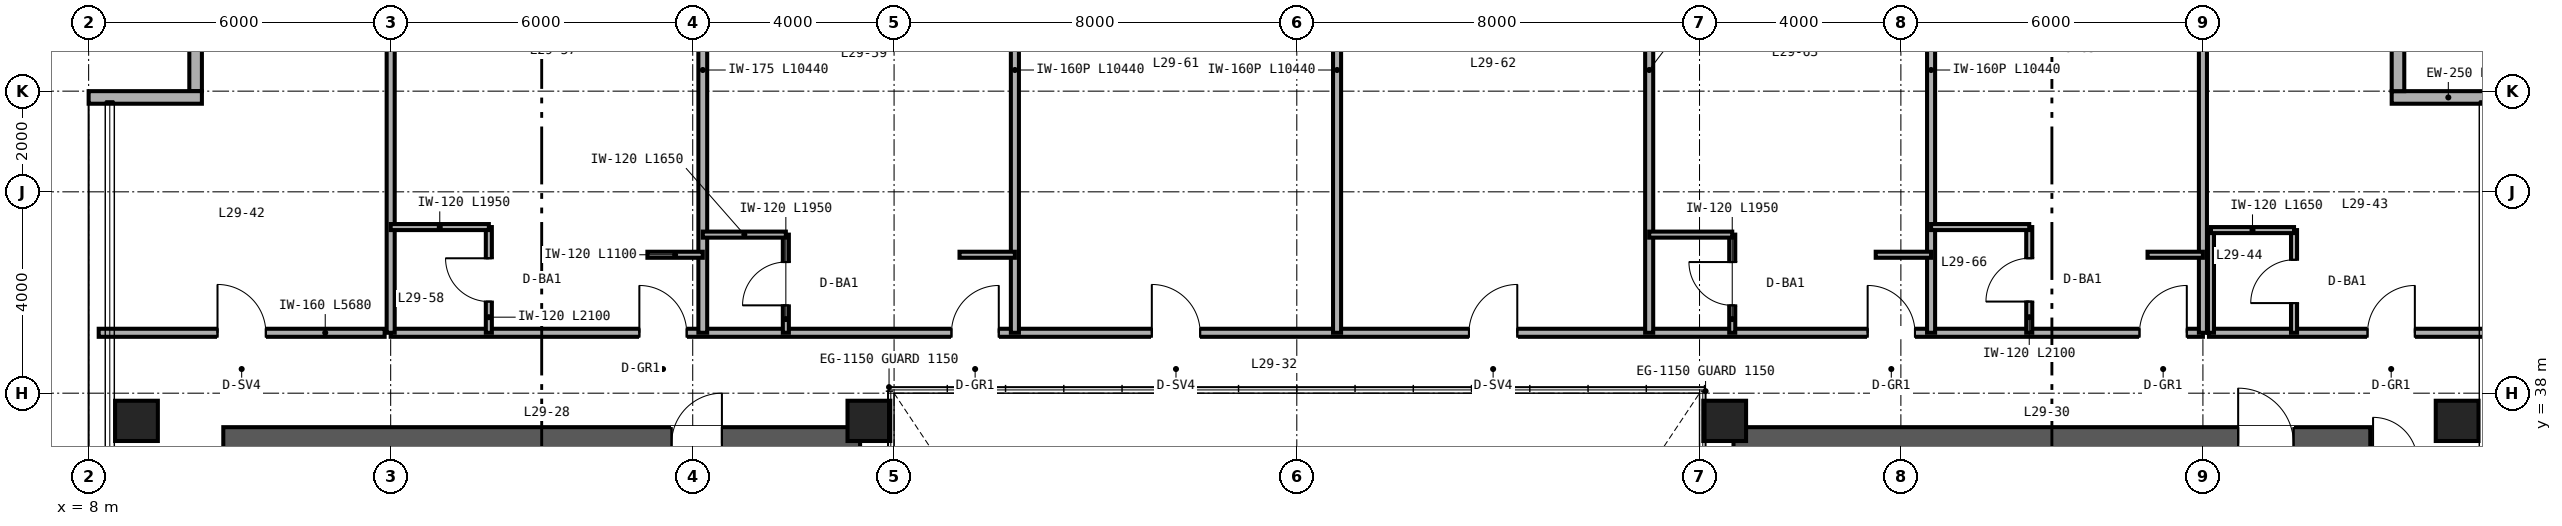
"""IFC4 building model, lengths in metres.
Left out: names, types, materials, properties, quantities, classifications, styles, units other than length and angle.
Written with IfcOpenShell. Run it as: python <this file> out.ifc"""

import sys

from ifc_helpers import new_model, si_unit, direction, frame, frame_2d, origin, origin_2d, place, context, subcontext, project, spatial, rectangle, hollow_rectangle, extrude, source, transform, mapped, element, fill, save


model = new_model("IFC4")
c1 = context("Model", 3, precision=1e-05, world=origin(), true_north=direction((0.0, 1.0)))
c2 = subcontext(c1, "Body", "Model", "MODEL_VIEW")
j1 = project(units=[si_unit("LENGTHUNIT", "METRE"), si_unit("PLANEANGLEUNIT", "RADIAN")], contexts=[c1])
p1 = place(None, origin())
s1 = spatial("IfcSite", under=j1, at=p1, CompositionType="ELEMENT")
p2 = place(p1, origin())
s2 = spatial("IfcBuilding", under=s1, at=p2, CompositionType="ELEMENT")
p3 = place(p2, frame((0.0, 0.0, 118.8)))
s3 = spatial("IfcBuildingStorey", under=s2, at=p3, CompositionType="ELEMENT", Elevation=118.8)
p4 = place(p3, frame((10.675, 37.0, 0.0), z_axis=(0.0, 0.0, 1.0), x_axis=(1.0, 0.0, 0.0)))
e1 = element("IfcWall", 1, at=p4, inside=s3, PredefinedType="SHEAR", context=c2, shape_type="SweptSolid", body=[
    extrude(rectangle(XDim=12.65, YDim=0.65, at=frame_2d((6.325, 0.0))), origin(), (0.0, 0.0, 1.0), 3.36),
])
p5 = place(p4, frame((8.905, 0.0, 0.0)))
e2 = element("IfcOpeningElement", 2, at=p5, cuts=e1, PredefinedType="OPENING", context=c2, shape_type="SweptSolid", body=[
    extrude(rectangle(XDim=1.0, YDim=2.15, at=frame_2d((0.5, 1.075))), frame((0.0, 0.335, 0.0), z_axis=(0.0, -1.0, 0.0), x_axis=(1.0, 0.0, 0.0)), (0.0, 0.0, 1.0), 0.67),
])
p6 = place(p3, frame((40.675, 37.0, 0.0), z_axis=(0.0, 0.0, 1.0), x_axis=(1.0, 0.0, 0.0)))
e3 = element("IfcWall", 3, at=p6, inside=s3, PredefinedType="SHEAR", context=c2, shape_type="SweptSolid", body=[
    extrude(rectangle(XDim=12.65, YDim=0.65, at=frame_2d((6.325, 0.0))), origin(), (0.0, 0.0, 1.0), 3.36),
])
p7 = place(p6, frame((10.025, 0.0, 0.0)))
e4 = element("IfcOpeningElement", 4, at=p7, cuts=e3, PredefinedType="OPENING", context=c2, shape_type="SweptSolid", body=[
    extrude(rectangle(XDim=1.1, YDim=2.15, at=frame_2d((0.55, 1.075))), frame((0.0, 0.335, 0.0), z_axis=(0.0, -1.0, 0.0), x_axis=(1.0, 0.0, 0.0)), (0.0, 0.0, 1.0), 0.67),
])
m1 = source(origin(), c2, "Body", "SweptSolid", [
    extrude(hollow_rectangle(XDim=0.85, YDim=0.8, WallThickness=0.032, at=origin_2d()), origin(), (0.0, 0.0, 1.0), 3.36),
])
for number, where, z_axis, x_axis in (
    (5, (8.95, 37.45, 0.0), (0.0, 0.0, 1.0), (1.0, 0.0, 0.0)),
    (6, (23.5, 37.45, 0.0), (0.0, 0.0, 1.0), (1.0, 0.0, 0.0)),
    (7, (40.5, 37.45, 0.0), (0.0, 0.0, 1.0), (1.0, 0.0, 0.0)),
    (8, (55.05, 37.45, 0.0), (0.0, 0.0, 1.0), (1.0, 0.0, 0.0)),
):
    element("IfcColumn", number, at=place(p3, frame(where, z_axis=z_axis, x_axis=x_axis)), inside=s3, PredefinedType="COLUMN", context=c2, shape_type="MappedRepresentation", body=[
        mapped(m1, transform((0.0, 0.0, 0.0), scale=1.0)),
    ])
p8 = place(p3, frame((56.0, 43.875, 0.0), z_axis=(0.0, 0.0, 1.0), x_axis=(-1.0, 0.0, 0.0)))
e9 = element("IfcWall", 9, at=p8, inside=s3, PredefinedType="SOLIDWALL", context=c2, shape_type="SweptSolid", body=[
    extrude(rectangle(XDim=2.25, YDim=0.25, at=frame_2d((1.125, 0.0))), origin(), (0.0, 0.0, 1.0), 3.36),
])
for number, where, z_axis, x_axis in (
    (10, (53.875, 44.0, 0.0), (0.0, 0.0, 1.0), (0.0, 1.0, 0.0)),
    (11, (10.125, 46.0, 0.0), (0.0, 0.0, 1.0), (0.0, -1.0, 0.0)),
):
    element("IfcWall", number, at=place(p3, frame(where, z_axis=z_axis, x_axis=x_axis)), inside=s3, PredefinedType="SOLIDWALL", context=c2, shape_type="SweptSolid", body=[
        extrude(rectangle(XDim=2.0, YDim=0.25, at=frame_2d((1.0, 0.0))), origin(), (0.0, 0.0, 1.0), 3.36),
    ])
p9 = place(p3, frame((10.25, 43.875, 0.0), z_axis=(0.0, 0.0, 1.0), x_axis=(-1.0, 0.0, 0.0)))
e12 = element("IfcWall", 12, at=p9, inside=s3, PredefinedType="SOLIDWALL", context=c2, shape_type="SweptSolid", body=[
    extrude(rectangle(XDim=2.25, YDim=0.25, at=frame_2d((1.125, 0.0))), origin(), (0.0, 0.0, 1.0), 3.36),
])
p10 = place(p3, frame((8.2, 39.2, 0.0), z_axis=(0.0, 0.0, 1.0), x_axis=(1.0, 0.0, 0.0)))
e13 = element("IfcWall", 13, at=p10, inside=s3, PredefinedType="PARTITIONING", context=c2, shape_type="SweptSolid", body=[
    extrude(rectangle(XDim=5.68, YDim=0.16, at=frame_2d((2.84, 0.0))), origin(), (0.0, 0.0, 1.0), 3.36),
])
p11 = place(p10, frame((2.36, 0.0, 0.0)))
e14 = element("IfcOpeningElement", 14, at=p11, cuts=e13, PredefinedType="OPENING", context=c2, shape_type="SweptSolid", body=[
    extrude(rectangle(XDim=0.96, YDim=2.15, at=frame_2d((0.48, 1.075))), frame((0.0, 0.09, 0.0), z_axis=(0.0, -1.0, 0.0), x_axis=(1.0, 0.0, 0.0)), (0.0, 0.0, 1.0), 0.18),
])
p12 = place(p3, frame((50.12, 39.2, 0.0), z_axis=(0.0, 0.0, 1.0), x_axis=(1.0, 0.0, 0.0)))
e15 = element("IfcWall", 15, at=p12, inside=s3, PredefinedType="PARTITIONING", context=c2, shape_type="SweptSolid", body=[
    extrude(rectangle(XDim=5.68, YDim=0.16, at=frame_2d((2.84, 0.0))), origin(), (0.0, 0.0, 1.0), 3.36),
])
p13 = place(p12, frame((3.15, 0.0, 0.0)))
e16 = element("IfcOpeningElement", 16, at=p13, cuts=e15, PredefinedType="OPENING", context=c2, shape_type="SweptSolid", body=[
    extrude(rectangle(XDim=0.94, YDim=2.15, at=frame_2d((0.47, 1.075))), frame((0.0, 0.09, 0.0), z_axis=(0.0, -1.0, 0.0), x_axis=(1.0, 0.0, 0.0)), (0.0, 0.0, 1.0), 0.18),
])
p14 = place(p3, frame((51.81, 39.2, 0.0), z_axis=(0.0, 0.0, 1.0), x_axis=(0.0, 1.0, 0.0)))
e17 = element("IfcWall", 17, at=p14, inside=s3, PredefinedType="PARTITIONING", context=c2, shape_type="SweptSolid", body=[
    extrude(rectangle(XDim=2.04, YDim=0.12, at=frame_2d((1.02, 0.0))), origin(), (0.0, 0.0, 1.0), 3.36),
])
p15 = place(p14, frame((0.59, 0.0, 0.0)))
e18 = element("IfcOpeningElement", 18, at=p15, cuts=e17, PredefinedType="OPENING", context=c2, shape_type="SweptSolid", body=[
    extrude(rectangle(XDim=0.86, YDim=2.1, at=frame_2d((0.43, 1.05))), frame((0.0, 0.07, 0.0), z_axis=(0.0, -1.0, 0.0), x_axis=(1.0, 0.0, 0.0)), (0.0, 0.0, 1.0), 0.14),
])
p16 = place(p3, frame((50.16, 39.2, 0.0), z_axis=(0.0, 0.0, 1.0), x_axis=(0.0, 1.0, 0.0)))
e19 = element("IfcWall", 19, at=p16, inside=s3, PredefinedType="PARTITIONING", context=c2, shape_type="SweptSolid", body=[
    extrude(rectangle(XDim=2.04, YDim=0.12, at=frame_2d((1.02, 0.0))), origin(), (0.0, 0.0, 1.0), 3.36),
])
p17 = place(p3, frame((50.16, 41.24, 0.0), z_axis=(0.0, 0.0, 1.0), x_axis=(1.0, 0.0, 0.0)))
e20 = element("IfcWall", 20, at=p17, inside=s3, PredefinedType="PARTITIONING", context=c2, shape_type="SweptSolid", body=[
    extrude(rectangle(XDim=1.65, YDim=0.12, at=frame_2d((0.825, 0.0))), origin(), (0.0, 0.0, 1.0), 3.36),
])
p18 = place(p3, frame((14.0, 39.2, 0.0), z_axis=(0.0, 0.0, 1.0), x_axis=(1.0, 0.0, 0.0)))
e21 = element("IfcWall", 21, at=p18, inside=s3, PredefinedType="PARTITIONING", context=c2, shape_type="SweptSolid", body=[
    extrude(rectangle(XDim=36.0, YDim=0.16, at=frame_2d((18.0, 0.0))), origin(), (0.0, 0.0, 1.0), 2.581),
])
p19 = place(p18, frame((4.94, 0.0, 0.0)))
e22 = element("IfcOpeningElement", 22, at=p19, cuts=e21, PredefinedType="OPENING", context=c2, shape_type="SweptSolid", body=[
    extrude(rectangle(XDim=0.94, YDim=2.15, at=frame_2d((0.47, 1.075))), frame((0.0, 0.09, 0.0), z_axis=(0.0, -1.0, 0.0), x_axis=(1.0, 0.0, 0.0)), (0.0, 0.0, 1.0), 0.18),
])
p20 = place(p18, frame((11.14, 0.0, 0.0)))
e23 = element("IfcOpeningElement", 23, at=p20, cuts=e21, PredefinedType="OPENING", context=c2, shape_type="SweptSolid", body=[
    extrude(rectangle(XDim=0.94, YDim=2.15, at=frame_2d((0.47, 1.075))), frame((0.0, 0.09, 0.0), z_axis=(0.0, -1.0, 0.0), x_axis=(1.0, 0.0, 0.0)), (0.0, 0.0, 1.0), 0.18),
])
p21 = place(p18, frame((15.12, 0.0, 0.0)))
e24 = element("IfcOpeningElement", 24, at=p21, cuts=e21, PredefinedType="OPENING", context=c2, shape_type="SweptSolid", body=[
    extrude(rectangle(XDim=0.96, YDim=2.15, at=frame_2d((0.48, 1.075))), frame((0.0, 0.09, 0.0), z_axis=(0.0, -1.0, 0.0), x_axis=(1.0, 0.0, 0.0)), (0.0, 0.0, 1.0), 0.18),
])
p22 = place(p18, frame((21.42, 0.0, 0.0)))
e25 = element("IfcOpeningElement", 25, at=p22, cuts=e21, PredefinedType="OPENING", context=c2, shape_type="SweptSolid", body=[
    extrude(rectangle(XDim=0.96, YDim=2.15, at=frame_2d((0.48, 1.075))), frame((0.0, 0.09, 0.0), z_axis=(0.0, -1.0, 0.0), x_axis=(1.0, 0.0, 0.0)), (0.0, 0.0, 1.0), 0.18),
])
p23 = place(p18, frame((29.34, 0.0, 0.0)))
e26 = element("IfcOpeningElement", 26, at=p23, cuts=e21, PredefinedType="OPENING", context=c2, shape_type="SweptSolid", body=[
    extrude(rectangle(XDim=0.94, YDim=2.15, at=frame_2d((0.47, 1.075))), frame((0.0, 0.09, 0.0), z_axis=(0.0, -1.0, 0.0), x_axis=(1.0, 0.0, 0.0)), (0.0, 0.0, 1.0), 0.18),
])
p24 = place(p18, frame((34.74, 0.0, 0.0)))
e27 = element("IfcOpeningElement", 27, at=p24, cuts=e21, PredefinedType="OPENING", context=c2, shape_type="SweptSolid", body=[
    extrude(rectangle(XDim=0.94, YDim=2.15, at=frame_2d((0.47, 1.075))), frame((0.0, 0.09, 0.0), z_axis=(0.0, -1.0, 0.0), x_axis=(1.0, 0.0, 0.0)), (0.0, 0.0, 1.0), 0.18),
])
for number, where, z_axis, x_axis in (
    (28, (14.0, 39.2, 0.0), (0.0, 0.0, 1.0), (0.0, 1.0, 0.0)),
    (29, (50.0, 39.2, 0.0), (0.0, 0.0, 1.0), (0.0, 1.0, 0.0)),
):
    element("IfcWall", number, at=place(p3, frame(where, z_axis=z_axis, x_axis=x_axis)), inside=s3, PredefinedType="PARTITIONING", context=c2, shape_type="SweptSolid", body=[
        extrude(rectangle(XDim=10.44, YDim=0.16, at=frame_2d((5.22, 0.0))), origin(), (0.0, 0.0, 1.0), 2.667),
    ])
p25 = place(p3, frame((20.2, 39.2, 0.0), z_axis=(0.0, 0.0, 1.0), x_axis=(0.0, 1.0, 0.0)))
e30 = element("IfcWall", 30, at=p25, inside=s3, PredefinedType="PARTITIONING", context=c2, shape_type="SweptSolid", body=[
    extrude(rectangle(XDim=10.44, YDim=0.175, at=frame_2d((5.22, 0.0))), origin(), (0.0, 0.0, 1.0), 2.667),
])
p26 = place(p3, frame((15.95, 39.2, 0.0), z_axis=(0.0, 0.0, 1.0), x_axis=(0.0, 1.0, 0.0)))
e31 = element("IfcWall", 31, at=p26, inside=s3, PredefinedType="PARTITIONING", context=c2, shape_type="SweptSolid", body=[
    extrude(rectangle(XDim=2.1, YDim=0.12, at=frame_2d((1.05, 0.0))), origin(), (0.0, 0.0, 1.0), 3.36),
])
p27 = place(p26, frame((0.62, 0.0, 0.0)))
e32 = element("IfcOpeningElement", 32, at=p27, cuts=e31, PredefinedType="OPENING", context=c2, shape_type="SweptSolid", body=[
    extrude(rectangle(XDim=0.86, YDim=2.1, at=frame_2d((0.43, 1.05))), frame((0.0, 0.07, 0.0), z_axis=(0.0, -1.0, 0.0), x_axis=(1.0, 0.0, 0.0)), (0.0, 0.0, 1.0), 0.14),
])
p28 = place(p3, frame((14.0, 41.3, 0.0), z_axis=(0.0, 0.0, 1.0), x_axis=(1.0, 0.0, 0.0)))
e33 = element("IfcWall", 33, at=p28, inside=s3, PredefinedType="PARTITIONING", context=c2, shape_type="SweptSolid", body=[
    extrude(rectangle(XDim=1.95, YDim=0.12, at=frame_2d((0.975, 0.0))), origin(), (0.0, 0.0, 1.0), 3.36),
])
p29 = place(p3, frame((19.1, 40.75, 0.0), z_axis=(0.0, 0.0, 1.0), x_axis=(1.0, 0.0, 0.0)))
e34 = element("IfcWall", 34, at=p29, inside=s3, PredefinedType="PARTITIONING", context=c2, shape_type="SweptSolid", body=[
    extrude(rectangle(XDim=1.1, YDim=0.12, at=frame_2d((0.55, 0.0))), origin(), (0.0, 0.0, 1.0), 3.36),
])
p30 = place(p3, frame((26.4, 39.2, 0.0), z_axis=(0.0, 0.0, 1.0), x_axis=(0.0, 1.0, 0.0)))
e35 = element("IfcWall", 35, at=p30, inside=s3, PredefinedType="PARTITIONING", context=c2, shape_type="SweptSolid", body=[
    extrude(rectangle(XDim=10.44, YDim=0.16, at=frame_2d((5.22, 0.0))), origin(), (0.0, 0.0, 1.0), 2.433),
])
p31 = place(p3, frame((21.85, 39.2, 0.0), z_axis=(0.0, 0.0, 1.0), x_axis=(0.0, 1.0, 0.0)))
e36 = element("IfcWall", 36, at=p31, inside=s3, PredefinedType="PARTITIONING", context=c2, shape_type="SweptSolid", body=[
    extrude(rectangle(XDim=1.95, YDim=0.12, at=frame_2d((0.975, 0.0))), origin(), (0.0, 0.0, 1.0), 3.36),
])
p32 = place(p31, frame((0.545, 0.0, 0.0)))
e37 = element("IfcOpeningElement", 37, at=p32, cuts=e36, PredefinedType="OPENING", context=c2, shape_type="SweptSolid", body=[
    extrude(rectangle(XDim=0.86, YDim=2.1, at=frame_2d((0.43, 1.05))), frame((0.0, 0.07, 0.0), z_axis=(0.0, -1.0, 0.0), x_axis=(1.0, 0.0, 0.0)), (0.0, 0.0, 1.0), 0.14),
])
p33 = place(p3, frame((20.2, 41.15, 0.0), z_axis=(0.0, 0.0, 1.0), x_axis=(1.0, 0.0, 0.0)))
e38 = element("IfcWall", 38, at=p33, inside=s3, PredefinedType="PARTITIONING", context=c2, shape_type="SweptSolid", body=[
    extrude(rectangle(XDim=1.65, YDim=0.12, at=frame_2d((0.825, 0.0))), origin(), (0.0, 0.0, 1.0), 3.36),
])
p34 = place(p3, frame((25.3, 40.75, 0.0), z_axis=(0.0, 0.0, 1.0), x_axis=(1.0, 0.0, 0.0)))
e39 = element("IfcWall", 39, at=p34, inside=s3, PredefinedType="PARTITIONING", context=c2, shape_type="SweptSolid", body=[
    extrude(rectangle(XDim=1.1, YDim=0.12, at=frame_2d((0.55, 0.0))), origin(), (0.0, 0.0, 1.0), 3.36),
])
for number, where, z_axis, x_axis in (
    (40, (32.8, 39.2, 0.0), (0.0, 0.0, 1.0), (0.0, 1.0, 0.0)),
    (41, (39.0, 39.2, 0.0), (0.0, 0.0, 1.0), (0.0, 1.0, 0.0)),
):
    element("IfcWall", number, at=place(p3, frame(where, z_axis=z_axis, x_axis=x_axis)), inside=s3, PredefinedType="PARTITIONING", context=c2, shape_type="SweptSolid", body=[
        extrude(rectangle(XDim=10.44, YDim=0.16, at=frame_2d((5.22, 0.0))), origin(), (0.0, 0.0, 1.0), 2.433),
    ])
p35 = place(p3, frame((44.6, 39.2, 0.0), z_axis=(0.0, 0.0, 1.0), x_axis=(0.0, 1.0, 0.0)))
e42 = element("IfcWall", 42, at=p35, inside=s3, PredefinedType="PARTITIONING", context=c2, shape_type="SweptSolid", body=[
    extrude(rectangle(XDim=10.44, YDim=0.16, at=frame_2d((5.22, 0.0))), origin(), (0.0, 0.0, 1.0), 2.667),
])
p36 = place(p3, frame((40.65, 39.2, 0.0), z_axis=(0.0, 0.0, 1.0), x_axis=(0.0, 1.0, 0.0)))
e43 = element("IfcWall", 43, at=p36, inside=s3, PredefinedType="PARTITIONING", context=c2, shape_type="SweptSolid", body=[
    extrude(rectangle(XDim=1.95, YDim=0.12, at=frame_2d((0.975, 0.0))), origin(), (0.0, 0.0, 1.0), 2.581),
])
p37 = place(p36, frame((0.545, 0.0, 0.0)))
e44 = element("IfcOpeningElement", 44, at=p37, cuts=e43, PredefinedType="OPENING", context=c2, shape_type="SweptSolid", body=[
    extrude(rectangle(XDim=0.86, YDim=2.1, at=frame_2d((0.43, 1.05))), frame((0.0, 0.07, 0.0), z_axis=(0.0, -1.0, 0.0), x_axis=(1.0, 0.0, 0.0)), (0.0, 0.0, 1.0), 0.14),
])
p38 = place(p3, frame((39.0, 41.15, 0.0), z_axis=(0.0, 0.0, 1.0), x_axis=(1.0, 0.0, 0.0)))
e45 = element("IfcWall", 45, at=p38, inside=s3, PredefinedType="PARTITIONING", context=c2, shape_type="SweptSolid", body=[
    extrude(rectangle(XDim=1.65, YDim=0.12, at=frame_2d((0.825, 0.0))), origin(), (0.0, 0.0, 1.0), 2.581),
])
p39 = place(p3, frame((43.5, 40.75, 0.0), z_axis=(0.0, 0.0, 1.0), x_axis=(1.0, 0.0, 0.0)))
e46 = element("IfcWall", 46, at=p39, inside=s3, PredefinedType="PARTITIONING", context=c2, shape_type="SweptSolid", body=[
    extrude(rectangle(XDim=1.1, YDim=0.12, at=frame_2d((0.55, 0.0))), origin(), (0.0, 0.0, 1.0), 3.36),
])
p40 = place(p3, frame((46.55, 39.2, 0.0), z_axis=(0.0, 0.0, 1.0), x_axis=(0.0, 1.0, 0.0)))
e47 = element("IfcWall", 47, at=p40, inside=s3, PredefinedType="PARTITIONING", context=c2, shape_type="SweptSolid", body=[
    extrude(rectangle(XDim=2.1, YDim=0.12, at=frame_2d((1.05, 0.0))), origin(), (0.0, 0.0, 1.0), 3.36),
])
p41 = place(p40, frame((0.62, 0.0, 0.0)))
e48 = element("IfcOpeningElement", 48, at=p41, cuts=e47, PredefinedType="OPENING", context=c2, shape_type="SweptSolid", body=[
    extrude(rectangle(XDim=0.86, YDim=2.1, at=frame_2d((0.43, 1.05))), frame((0.0, 0.07, 0.0), z_axis=(0.0, -1.0, 0.0), x_axis=(1.0, 0.0, 0.0)), (0.0, 0.0, 1.0), 0.14),
])
p42 = place(p3, frame((44.6, 41.3, 0.0), z_axis=(0.0, 0.0, 1.0), x_axis=(1.0, 0.0, 0.0)))
e49 = element("IfcWall", 49, at=p42, inside=s3, PredefinedType="PARTITIONING", context=c2, shape_type="SweptSolid", body=[
    extrude(rectangle(XDim=1.95, YDim=0.12, at=frame_2d((0.975, 0.0))), origin(), (0.0, 0.0, 1.0), 3.36),
])
p43 = place(p3, frame((48.9, 40.75, 0.0), z_axis=(0.0, 0.0, 1.0), x_axis=(1.0, 0.0, 0.0)))
e50 = element("IfcWall", 50, at=p43, inside=s3, PredefinedType="PARTITIONING", context=c2, shape_type="SweptSolid", body=[
    extrude(rectangle(XDim=1.1, YDim=0.12, at=frame_2d((0.55, 0.0))), origin(), (0.0, 0.0, 1.0), 3.36),
])
m2 = source(origin(), c2, "Body", "SweptSolid", [
    extrude(rectangle(XDim=1.0, YDim=2.15, at=frame_2d((0.5, 1.075))), frame((0.0, 0.025, 0.0), z_axis=(0.0, -1.0, 0.0), x_axis=(1.0, 0.0, 0.0)), (0.0, 0.0, 1.0), 0.05),
])
p44 = place(p5, origin())
e51 = element("IfcDoor", 51, at=p44, inside=s3, OperationType="SINGLE_SWING_RIGHT", PredefinedType="DOOR", context=c2, shape_type="MappedRepresentation", body=[
    mapped(m2, transform((0.0, 0.0, 0.0), scale=1.0)),
])
fill(e2, e51)
m3 = source(origin(), c2, "Body", "SweptSolid", [
    extrude(rectangle(XDim=1.1, YDim=2.15, at=frame_2d((0.55, 1.075))), frame((0.0, 0.025, 0.0), z_axis=(0.0, -1.0, 0.0), x_axis=(1.0, 0.0, 0.0)), (0.0, 0.0, 1.0), 0.05),
])
p45 = place(p7, origin())
e52 = element("IfcDoor", 52, at=p45, inside=s3, OperationType="SINGLE_SWING_LEFT", PredefinedType="DOOR", context=c2, shape_type="MappedRepresentation", body=[
    mapped(m3, transform((0.0, 0.0, 0.0), scale=1.0)),
])
fill(e4, e52)
m4 = source(origin(), c2, "Body", "SweptSolid", [
    extrude(rectangle(XDim=0.96, YDim=2.15, at=frame_2d((0.48, 1.075))), frame((0.0, 0.025, 0.0), z_axis=(0.0, -1.0, 0.0), x_axis=(1.0, 0.0, 0.0)), (0.0, 0.0, 1.0), 0.05),
])
p46 = place(p11, origin())
e53 = element("IfcDoor", 53, at=p46, inside=s3, OperationType="SINGLE_SWING_LEFT", PredefinedType="DOOR", context=c2, shape_type="MappedRepresentation", body=[
    mapped(m4, transform((0.0, 0.0, 0.0), scale=1.0)),
])
fill(e14, e53)
m5 = source(origin(), c2, "Body", "SweptSolid", [
    extrude(rectangle(XDim=0.86, YDim=2.1, at=frame_2d((0.43, 1.05))), frame((0.0, 0.025, 0.0), z_axis=(0.0, -1.0, 0.0), x_axis=(1.0, 0.0, 0.0)), (0.0, 0.0, 1.0), 0.05),
])
p47 = place(p15, origin())
e54 = element("IfcDoor", 54, at=p47, inside=s3, OperationType="SINGLE_SWING_LEFT", PredefinedType="DOOR", context=c2, shape_type="MappedRepresentation", body=[
    mapped(m5, transform((0.0, 0.0, 0.0), scale=1.0)),
])
fill(e18, e54)
m6 = source(origin(), c2, "Body", "SweptSolid", [
    extrude(rectangle(XDim=0.94, YDim=2.15, at=frame_2d((0.47, 1.075))), frame((0.0, 0.025, 0.0), z_axis=(0.0, -1.0, 0.0), x_axis=(1.0, 0.0, 0.0)), (0.0, 0.0, 1.0), 0.05),
])
p48 = place(p13, origin())
e55 = element("IfcDoor", 55, at=p48, inside=s3, OperationType="SINGLE_SWING_RIGHT", PredefinedType="DOOR", context=c2, shape_type="MappedRepresentation", body=[
    mapped(m6, transform((0.0, 0.0, 0.0), scale=1.0)),
])
fill(e16, e55)
p49 = place(p27, origin())
e56 = element("IfcDoor", 56, at=p49, inside=s3, OperationType="SINGLE_SWING_RIGHT", PredefinedType="DOOR", context=c2, shape_type="MappedRepresentation", body=[
    mapped(m5, transform((0.0, 0.0, 0.0), scale=1.0)),
])
fill(e32, e56)
p50 = place(p32, origin())
e57 = element("IfcDoor", 57, at=p50, inside=s3, OperationType="SINGLE_SWING_LEFT", PredefinedType="DOOR", context=c2, shape_type="MappedRepresentation", body=[
    mapped(m5, transform((0.0, 0.0, 0.0), scale=1.0)),
])
fill(e37, e57)
p51 = place(p37, origin())
e58 = element("IfcDoor", 58, at=p51, inside=s3, OperationType="SINGLE_SWING_RIGHT", PredefinedType="DOOR", context=c2, shape_type="MappedRepresentation", body=[
    mapped(m5, transform((0.0, 0.0, 0.0), scale=1.0)),
])
fill(e44, e58)
p52 = place(p41, origin())
e59 = element("IfcDoor", 59, at=p52, inside=s3, OperationType="SINGLE_SWING_LEFT", PredefinedType="DOOR", context=c2, shape_type="MappedRepresentation", body=[
    mapped(m5, transform((0.0, 0.0, 0.0), scale=1.0)),
])
fill(e48, e59)
p53 = place(p19, origin())
e60 = element("IfcDoor", 60, at=p53, inside=s3, OperationType="SINGLE_SWING_LEFT", PredefinedType="DOOR", context=c2, shape_type="MappedRepresentation", body=[
    mapped(m6, transform((0.0, 0.0, 0.0), scale=1.0)),
])
fill(e22, e60)
p54 = place(p20, origin())
e61 = element("IfcDoor", 61, at=p54, inside=s3, OperationType="SINGLE_SWING_RIGHT", PredefinedType="DOOR", context=c2, shape_type="MappedRepresentation", body=[
    mapped(m6, transform((0.0, 0.0, 0.0), scale=1.0)),
])
fill(e23, e61)
p55 = place(p21, origin())
e62 = element("IfcDoor", 62, at=p55, inside=s3, OperationType="SINGLE_SWING_LEFT", PredefinedType="DOOR", context=c2, shape_type="MappedRepresentation", body=[
    mapped(m4, transform((0.0, 0.0, 0.0), scale=1.0)),
])
fill(e24, e62)
p56 = place(p22, origin())
e63 = element("IfcDoor", 63, at=p56, inside=s3, OperationType="SINGLE_SWING_RIGHT", PredefinedType="DOOR", context=c2, shape_type="MappedRepresentation", body=[
    mapped(m4, transform((0.0, 0.0, 0.0), scale=1.0)),
])
fill(e25, e63)
p57 = place(p23, origin())
e64 = element("IfcDoor", 64, at=p57, inside=s3, OperationType="SINGLE_SWING_LEFT", PredefinedType="DOOR", context=c2, shape_type="MappedRepresentation", body=[
    mapped(m6, transform((0.0, 0.0, 0.0), scale=1.0)),
])
fill(e26, e64)
p58 = place(p24, origin())
e65 = element("IfcDoor", 65, at=p58, inside=s3, OperationType="SINGLE_SWING_RIGHT", PredefinedType="DOOR", context=c2, shape_type="MappedRepresentation", body=[
    mapped(m6, transform((0.0, 0.0, 0.0), scale=1.0)),
])
fill(e27, e65)
save(model, sys.argv[1])
